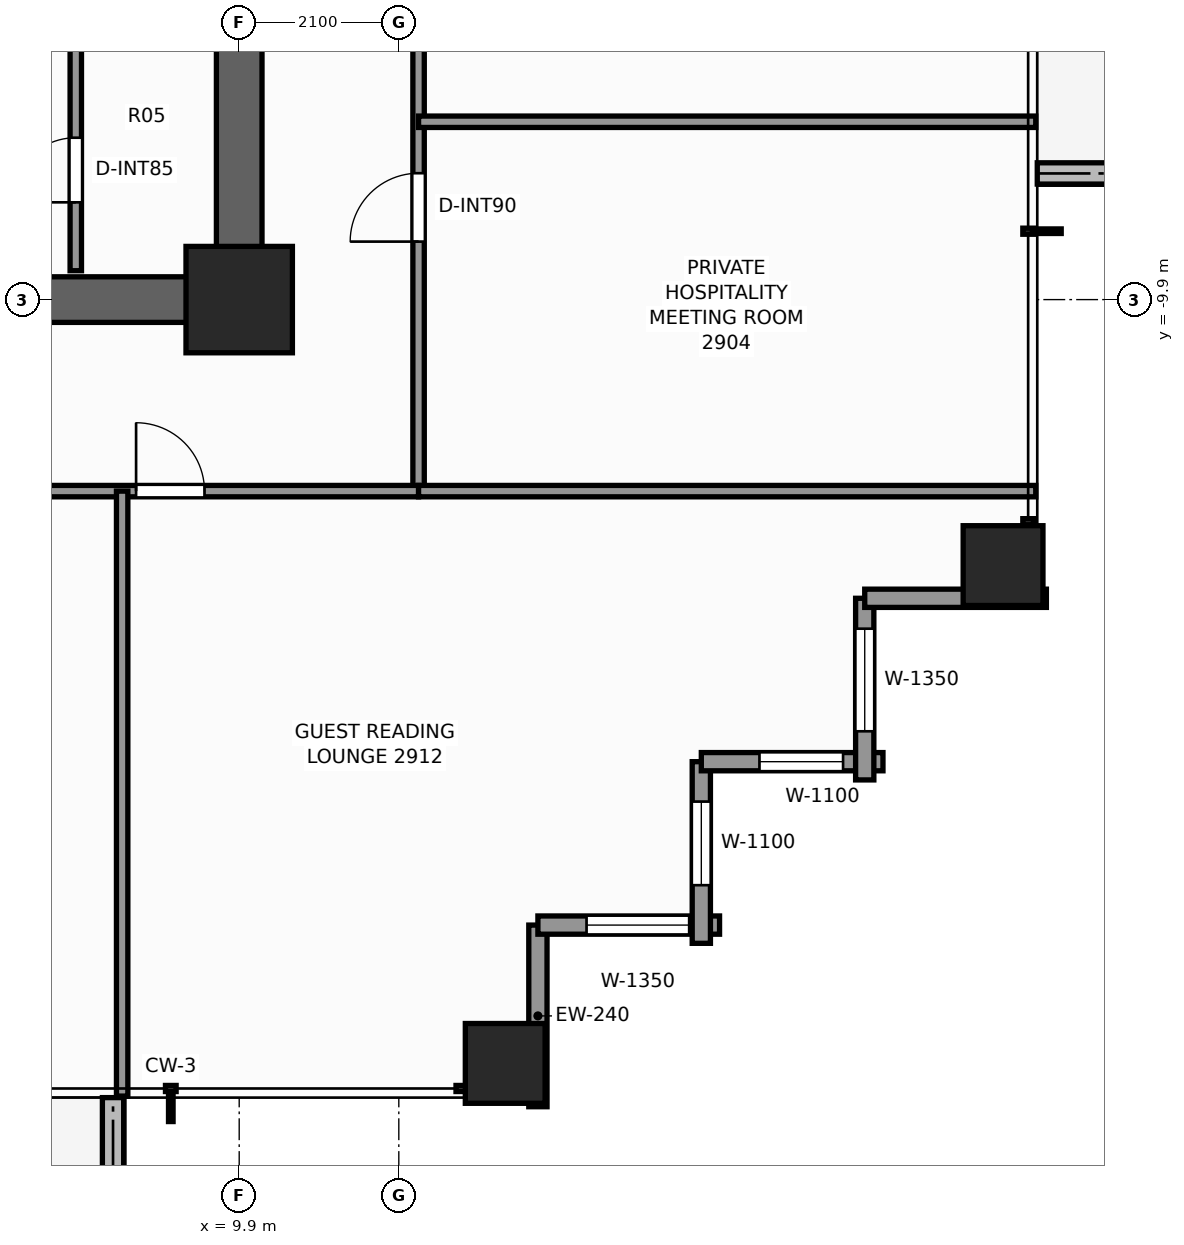
"""IFC4 building model, lengths in metres.
Left out: names, types, materials, properties, quantities, classifications, styles, units other than length and angle.
Written with IfcOpenShell. Run it as: python <this file> out.ifc"""

import sys

from ifc_helpers import new_model, si_unit, direction, frame, frame_2d, origin, origin_2d, place, context, subcontext, project, spatial, rectangle, extrude, element, fill, save


model = new_model("IFC4")
c1 = context("Model", 3, precision=1e-05, world=origin(), true_north=direction((0.0, 1.0)))
c2 = subcontext(c1, "Body", "Model", "MODEL_VIEW")
j1 = project(units=[si_unit("LENGTHUNIT", "METRE"), si_unit("PLANEANGLEUNIT", "RADIAN")], contexts=[c1])
p1 = place(None, origin())
s1 = spatial("IfcSite", under=j1, at=p1, CompositionType="ELEMENT")
p2 = place(p1, origin())
s2 = spatial("IfcBuilding", under=s1, at=p2, CompositionType="ELEMENT")
p3 = place(p2, frame((0.0, 0.0, 101.9)))
s3 = spatial("IfcBuildingStorey", under=s2, at=p3, CompositionType="ELEMENT", Elevation=101.9)
p4 = place(p3, frame((10.2, -9.9, 0.0), z_axis=(0.0, 0.0, 1.0), x_axis=(-1.0, 0.0, 0.0)))
e1 = element("IfcWall", 1, at=p4, inside=s3, PredefinedType="SHEAR", context=c2, shape_type="SweptSolid", body=[
    extrude(rectangle(XDim=12.06, YDim=0.6, at=frame_2d((6.03, 0.0))), origin(), (0.0, 0.0, 1.0), 3.3),
])
p5 = place(p3, frame((9.9, -9.6, 0.0), z_axis=(0.0, 0.0, 1.0), x_axis=(0.0, 1.0, 0.0)))
e2 = element("IfcWall", 2, at=p5, inside=s3, PredefinedType="SHEAR", context=c2, shape_type="SweptSolid", body=[
    extrude(rectangle(XDim=4.05, YDim=0.6, at=frame_2d((2.025, 0.0))), origin(), (0.0, 0.0, 1.0), 3.3),
])
p6 = place(p3, frame((9.9, -9.9, 0.0), z_axis=(0.0, 0.0, 1.0), x_axis=(1.0, 0.0, 0.0)))
e3 = element("IfcColumn", 3, at=p6, inside=s3, PredefinedType="COLUMN", context=c2, shape_type="SweptSolid", body=[
    extrude(rectangle(XDim=1.4, YDim=1.4, at=origin_2d()), origin(), (0.0, 0.0, 1.0), 3.3),
])
for number, where, z_axis, x_axis in (
    (4, (13.4, -19.95, 0.0), (0.0, 0.0, 1.0), (1.0, 0.0, 0.0)),
    (5, (19.95, -13.4, 0.0), (0.0, 0.0, 1.0), (1.0, 0.0, 0.0)),
):
    element("IfcColumn", number, at=place(p3, frame(where, z_axis=z_axis, x_axis=x_axis)), inside=s3, PredefinedType="COLUMN", context=c2, shape_type="SweptSolid", body=[
        extrude(rectangle(XDim=1.05, YDim=1.05, at=origin_2d()), origin(), (0.0, 0.0, 1.0), 3.3),
    ])
p7 = place(p3, frame((8.24, -23.7, -0.04), z_axis=(0.0, 0.0, 1.0), x_axis=(0.0, 1.0, 0.0)))
e6 = element("IfcWall", 6, at=p7, inside=s3, PredefinedType="PARAPET", context=c2, shape_type="SweptSolid", body=[
    extrude(rectangle(XDim=3.3, YDim=0.28, at=frame_2d((1.65, 0.0))), origin(), (0.0, 0.0, 1.0), 0.42),
])
p8 = place(p3, frame((20.4, -8.24, -0.04), z_axis=(0.0, 0.0, 1.0), x_axis=(1.0, 0.0, 0.0)))
e7 = element("IfcWall", 7, at=p8, inside=s3, PredefinedType="PARAPET", context=c2, shape_type="SweptSolid", body=[
    extrude(rectangle(XDim=3.42, YDim=0.28, at=frame_2d((1.71, 0.0))), origin(), (0.0, 0.0, 1.0), 0.42),
])
p9 = place(p3, frame((13.83, -18.13, 0.0), z_axis=(0.0, 0.0, 1.0), x_axis=(0.0, -1.0, 0.0)))
e8 = element("IfcWall", 8, at=p9, inside=s3, PredefinedType="STANDARD", context=c2, shape_type="SweptSolid", body=[
    extrude(rectangle(XDim=2.39, YDim=0.24, at=frame_2d((1.195, 0.0))), origin(), (0.0, 0.0, 1.0), 2.459),
])
p10 = place(p3, frame((16.22, -18.13, 0.0), z_axis=(0.0, 0.0, 1.0), x_axis=(-1.0, 0.0, 0.0)))
e9 = element("IfcWall", 9, at=p10, inside=s3, PredefinedType="STANDARD", context=c2, shape_type="SweptSolid", body=[
    extrude(rectangle(XDim=2.39, YDim=0.24, at=frame_2d((1.195, 0.0))), origin(), (0.0, 0.0, 1.0), 2.459),
])
p11 = place(p10, frame((0.4, 0.0, 0.65)))
e10 = element("IfcOpeningElement", 10, at=p11, cuts=e9, PredefinedType="OPENING", context=c2, shape_type="SweptSolid", body=[
    extrude(rectangle(XDim=1.35, YDim=1.55, at=frame_2d((0.675, 0.775))), frame((0.0, 0.13, 0.0), z_axis=(0.0, -1.0, 0.0), x_axis=(1.0, 0.0, 0.0)), (0.0, 0.0, 1.0), 0.26),
])
p12 = place(p3, frame((15.98, -15.98, 0.0), z_axis=(0.0, 0.0, 1.0), x_axis=(0.0, -1.0, 0.0)))
e11 = element("IfcWall", 11, at=p12, inside=s3, PredefinedType="STANDARD", context=c2, shape_type="SweptSolid", body=[
    extrude(rectangle(XDim=2.39, YDim=0.24, at=frame_2d((1.195, 0.0))), origin(), (0.0, 0.0, 1.0), 2.459),
])
p13 = place(p12, frame((0.525, 0.0, 0.65)))
e12 = element("IfcOpeningElement", 12, at=p13, cuts=e11, PredefinedType="OPENING", context=c2, shape_type="SweptSolid", body=[
    extrude(rectangle(XDim=1.1, YDim=1.45, at=frame_2d((0.55, 0.725))), frame((0.0, 0.13, 0.0), z_axis=(0.0, -1.0, 0.0), x_axis=(1.0, 0.0, 0.0)), (0.0, 0.0, 1.0), 0.26),
])
p14 = place(p3, frame((18.37, -15.98, 0.0), z_axis=(0.0, 0.0, 1.0), x_axis=(-1.0, 0.0, 0.0)))
e13 = element("IfcWall", 13, at=p14, inside=s3, PredefinedType="STANDARD", context=c2, shape_type="SweptSolid", body=[
    extrude(rectangle(XDim=2.39, YDim=0.24, at=frame_2d((1.195, 0.0))), origin(), (0.0, 0.0, 1.0), 2.459),
])
p15 = place(p14, frame((0.525, 0.0, 0.65)))
e14 = element("IfcOpeningElement", 14, at=p15, cuts=e13, PredefinedType="OPENING", context=c2, shape_type="SweptSolid", body=[
    extrude(rectangle(XDim=1.1, YDim=1.45, at=frame_2d((0.55, 0.725))), frame((0.0, 0.13, 0.0), z_axis=(0.0, -1.0, 0.0), x_axis=(1.0, 0.0, 0.0)), (0.0, 0.0, 1.0), 0.26),
])
p16 = place(p3, frame((18.13, -13.83, 0.0), z_axis=(0.0, 0.0, 1.0), x_axis=(0.0, -1.0, 0.0)))
e15 = element("IfcWall", 15, at=p16, inside=s3, PredefinedType="STANDARD", context=c2, shape_type="SweptSolid", body=[
    extrude(rectangle(XDim=2.39, YDim=0.24, at=frame_2d((1.195, 0.0))), origin(), (0.0, 0.0, 1.0), 2.459),
])
p17 = place(p16, frame((0.4, 0.0, 0.65)))
e16 = element("IfcOpeningElement", 16, at=p17, cuts=e15, PredefinedType="OPENING", context=c2, shape_type="SweptSolid", body=[
    extrude(rectangle(XDim=1.35, YDim=1.55, at=frame_2d((0.675, 0.775))), frame((0.0, 0.13, 0.0), z_axis=(0.0, -1.0, 0.0), x_axis=(1.0, 0.0, 0.0)), (0.0, 0.0, 1.0), 0.26),
])
p18 = place(p3, frame((20.52, -13.83, 0.0), z_axis=(0.0, 0.0, 1.0), x_axis=(-1.0, 0.0, 0.0)))
e17 = element("IfcWall", 17, at=p18, inside=s3, PredefinedType="STANDARD", context=c2, shape_type="SweptSolid", body=[
    extrude(rectangle(XDim=2.39, YDim=0.24, at=frame_2d((1.195, 0.0))), origin(), (0.0, 0.0, 1.0), 2.459),
])
p19 = place(p3, frame((7.75, -9.52, 0.0), z_axis=(0.0, 0.0, 1.0), x_axis=(0.0, 1.0, 0.0)))
e18 = element("IfcWall", 18, at=p19, inside=s3, PredefinedType="PARTITIONING", context=c2, shape_type="SweptSolid", body=[
    extrude(rectangle(XDim=3.8, YDim=0.15, at=frame_2d((1.9, 0.0))), origin(), (0.0, 0.0, 1.0), 3.08),
])
p20 = place(p19, frame((0.9, 0.0, 0.0)))
e19 = element("IfcOpeningElement", 19, at=p20, cuts=e18, PredefinedType="OPENING", context=c2, shape_type="SweptSolid", body=[
    extrude(rectangle(XDim=0.85, YDim=2.03, at=frame_2d((0.425, 1.015))), frame((0.0, 0.085, 0.0), z_axis=(0.0, -1.0, 0.0), x_axis=(1.0, 0.0, 0.0)), (0.0, 0.0, 1.0), 0.17),
])
p21 = place(p3, frame((12.26, -12.42, 0.0), z_axis=(0.0, 0.0, 1.0), x_axis=(0.0, 1.0, 0.0)))
e20 = element("IfcWall", 20, at=p21, inside=s3, PredefinedType="PARTITIONING", context=c2, shape_type="SweptSolid", body=[
    extrude(rectangle(XDim=24.84, YDim=0.15, at=frame_2d((12.42, 0.0))), origin(), (0.0, 0.0, 1.0), 2.292),
])
p22 = place(p21, frame((3.283, 0.0, 0.0)))
e21 = element("IfcOpeningElement", 21, at=p22, cuts=e20, PredefinedType="OPENING", context=c2, shape_type="SweptSolid", body=[
    extrude(rectangle(XDim=0.9, YDim=2.06, at=frame_2d((0.45, 1.03))), frame((0.0, 0.085, 0.0), z_axis=(0.0, -1.0, 0.0), x_axis=(1.0, 0.0, 0.0)), (0.0, 0.0, 1.0), 0.17),
])
p23 = place(p21, frame((9.94, 0.0, 0.0)))
e22 = element("IfcOpeningElement", 22, at=p23, cuts=e20, PredefinedType="OPENING", context=c2, shape_type="SweptSolid", body=[
    extrude(rectangle(XDim=0.9, YDim=2.06, at=frame_2d((0.45, 1.03))), frame((0.0, 0.085, 0.0), z_axis=(0.0, -1.0, 0.0), x_axis=(1.0, 0.0, 0.0)), (0.0, 0.0, 1.0), 0.17),
])
p24 = place(p21, frame((20.048, 0.0, 0.0)))
e23 = element("IfcOpeningElement", 23, at=p24, cuts=e20, PredefinedType="OPENING", context=c2, shape_type="SweptSolid", body=[
    extrude(rectangle(XDim=0.95, YDim=2.06, at=frame_2d((0.475, 1.03))), frame((0.0, 0.085, 0.0), z_axis=(0.0, -1.0, 0.0), x_axis=(1.0, 0.0, 0.0)), (0.0, 0.0, 1.0), 0.17),
])
p25 = place(p3, frame((-3.65, -12.42, 0.0), z_axis=(0.0, 0.0, 1.0), x_axis=(1.0, 0.0, 0.0)))
e24 = element("IfcWall", 24, at=p25, inside=s3, PredefinedType="PARTITIONING", context=c2, shape_type="SweptSolid", body=[
    extrude(rectangle(XDim=15.91, YDim=0.15, at=frame_2d((7.955, 0.0))), origin(), (0.0, 0.0, 1.0), 2.292),
])
p26 = place(p25, frame((3.749, 0.0, 0.0)))
e25 = element("IfcOpeningElement", 25, at=p26, cuts=e24, PredefinedType="OPENING", context=c2, shape_type="SweptSolid", body=[
    extrude(rectangle(XDim=0.95, YDim=2.06, at=frame_2d((0.475, 1.03))), frame((0.0, 0.085, 0.0), z_axis=(0.0, -1.0, 0.0), x_axis=(1.0, 0.0, 0.0)), (0.0, 0.0, 1.0), 0.17),
])
p27 = place(p25, frame((9.999, 0.0, 0.0)))
e26 = element("IfcOpeningElement", 26, at=p27, cuts=e24, PredefinedType="OPENING", context=c2, shape_type="SweptSolid", body=[
    extrude(rectangle(XDim=0.95, YDim=2.06, at=frame_2d((0.475, 1.03))), frame((0.0, 0.085, 0.0), z_axis=(0.0, -1.0, 0.0), x_axis=(1.0, 0.0, 0.0)), (0.0, 0.0, 1.0), 0.17),
])
p28 = place(p25, frame((12.193, 0.0, 0.0)))
e27 = element("IfcOpeningElement", 27, at=p28, cuts=e24, PredefinedType="OPENING", context=c2, shape_type="SweptSolid", body=[
    extrude(rectangle(XDim=0.9, YDim=2.06, at=frame_2d((0.45, 1.03))), frame((0.0, 0.085, 0.0), z_axis=(0.0, -1.0, 0.0), x_axis=(1.0, 0.0, 0.0)), (0.0, 0.0, 1.0), 0.17),
])
p29 = place(p3, frame((12.26, -12.42, 0.0), z_axis=(0.0, 0.0, 1.0), x_axis=(1.0, 0.0, 0.0)))
e28 = element("IfcWall", 28, at=p29, inside=s3, PredefinedType="PARTITIONING", context=c2, shape_type="SweptSolid", body=[
    extrude(rectangle(XDim=8.12, YDim=0.15, at=frame_2d((4.06, 0.0))), origin(), (0.0, 0.0, 1.0), 2.292),
])
p30 = place(p3, frame((12.26, -7.56, 0.0), z_axis=(0.0, 0.0, 1.0), x_axis=(1.0, 0.0, 0.0)))
e29 = element("IfcWall", 29, at=p30, inside=s3, PredefinedType="PARTITIONING", context=c2, shape_type="SweptSolid", body=[
    extrude(rectangle(XDim=8.12, YDim=0.15, at=frame_2d((4.06, 0.0))), origin(), (0.0, 0.0, 1.0), 2.449),
])
p31 = place(p3, frame((8.36, -20.38, 0.0), z_axis=(0.0, 0.0, 1.0), x_axis=(0.0, 1.0, 0.0)))
e30 = element("IfcWall", 30, at=p31, inside=s3, PredefinedType="PARTITIONING", context=c2, shape_type="SweptSolid", body=[
    extrude(rectangle(XDim=7.96, YDim=0.15, at=frame_2d((3.98, 0.0))), origin(), (0.0, 0.0, 1.0), 2.449),
])
p32 = place(p11, origin())
e31 = element("IfcWindow", 31, at=p32, inside=s3, PartitioningType="SINGLE_PANEL", PredefinedType="WINDOW", context=c2, shape_type="SweptSolid", body=[
    extrude(rectangle(XDim=1.35, YDim=1.55, at=frame_2d((0.675, 0.775))), frame((0.0, 0.03, 0.0), z_axis=(0.0, -1.0, 0.0), x_axis=(1.0, 0.0, 0.0)), (0.0, 0.0, 1.0), 0.06),
])
fill(e10, e31)
p33 = place(p13, origin())
e32 = element("IfcWindow", 32, at=p33, inside=s3, PartitioningType="SINGLE_PANEL", PredefinedType="WINDOW", context=c2, shape_type="SweptSolid", body=[
    extrude(rectangle(XDim=1.1, YDim=1.45, at=frame_2d((0.55, 0.725))), frame((0.0, 0.03, 0.0), z_axis=(0.0, -1.0, 0.0), x_axis=(1.0, 0.0, 0.0)), (0.0, 0.0, 1.0), 0.06),
])
fill(e12, e32)
p34 = place(p15, origin())
e33 = element("IfcWindow", 33, at=p34, inside=s3, PartitioningType="SINGLE_PANEL", PredefinedType="WINDOW", context=c2, shape_type="SweptSolid", body=[
    extrude(rectangle(XDim=1.1, YDim=1.45, at=frame_2d((0.55, 0.725))), frame((0.0, 0.03, 0.0), z_axis=(0.0, -1.0, 0.0), x_axis=(1.0, 0.0, 0.0)), (0.0, 0.0, 1.0), 0.06),
])
fill(e14, e33)
p35 = place(p17, origin())
e34 = element("IfcWindow", 34, at=p35, inside=s3, PartitioningType="SINGLE_PANEL", PredefinedType="WINDOW", context=c2, shape_type="SweptSolid", body=[
    extrude(rectangle(XDim=1.35, YDim=1.55, at=frame_2d((0.675, 0.775))), frame((0.0, 0.03, 0.0), z_axis=(0.0, -1.0, 0.0), x_axis=(1.0, 0.0, 0.0)), (0.0, 0.0, 1.0), 0.06),
])
fill(e16, e34)
p36 = place(p20, origin())
e35 = element("IfcDoor", 35, at=p36, inside=s3, OperationType="SINGLE_SWING_LEFT", PredefinedType="DOOR", context=c2, shape_type="SweptSolid", body=[
    extrude(rectangle(XDim=0.85, YDim=2.03, at=frame_2d((0.425, 1.015))), frame((0.0, 0.025, 0.0), z_axis=(0.0, -1.0, 0.0), x_axis=(1.0, 0.0, 0.0)), (0.0, 0.0, 1.0), 0.05),
])
fill(e19, e35)
p37 = place(p22, origin())
e36 = element("IfcDoor", 36, at=p37, inside=s3, OperationType="SINGLE_SWING_LEFT", PredefinedType="DOOR", context=c2, shape_type="SweptSolid", body=[
    extrude(rectangle(XDim=0.9, YDim=2.06, at=frame_2d((0.45, 1.03))), frame((0.0, 0.025, 0.0), z_axis=(0.0, -1.0, 0.0), x_axis=(1.0, 0.0, 0.0)), (0.0, 0.0, 1.0), 0.05),
])
fill(e21, e36)
p38 = place(p28, origin())
e37 = element("IfcDoor", 37, at=p38, inside=s3, OperationType="SINGLE_SWING_LEFT", PredefinedType="DOOR", context=c2, shape_type="SweptSolid", body=[
    extrude(rectangle(XDim=0.9, YDim=2.06, at=frame_2d((0.45, 1.03))), frame((0.0, 0.025, 0.0), z_axis=(0.0, -1.0, 0.0), x_axis=(1.0, 0.0, 0.0)), (0.0, 0.0, 1.0), 0.05),
])
fill(e27, e37)
save(model, sys.argv[1])
